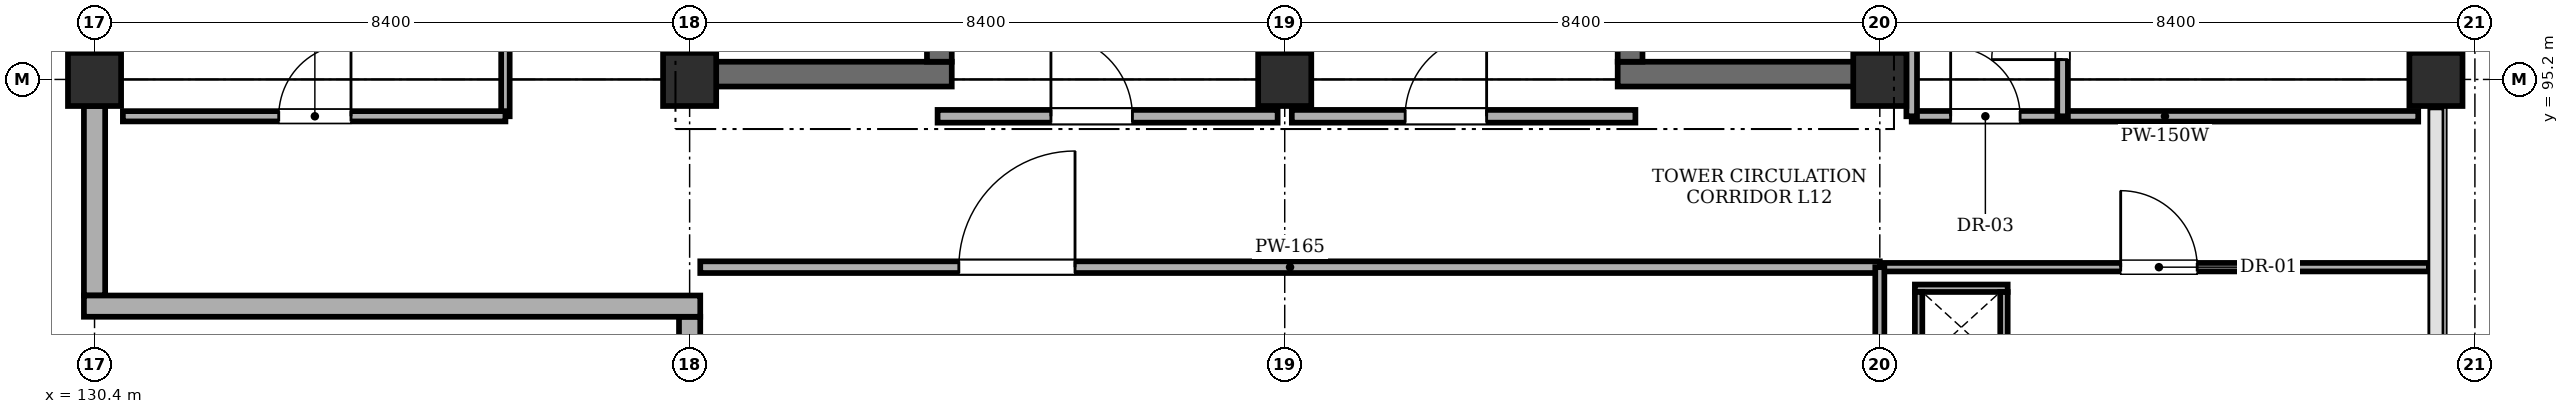
"""IFC4 building model, lengths in metres.
Left out: names, types, materials, properties, quantities, classifications, styles, units other than length and angle.
Written with IfcOpenShell. Run it as: python <this file> out.ifc"""

import sys

from ifc_helpers import new_model, si_unit, direction, frame, frame_2d, origin, origin_2d, place, context, subcontext, project, spatial, rectangle, extrude, element, fill, save


model = new_model("IFC4")
c1 = context("Model", 3, precision=1e-05, world=origin(), true_north=direction((0.0, 1.0)))
c2 = subcontext(c1, "Body", "Model", "MODEL_VIEW")
j1 = project(units=[si_unit("LENGTHUNIT", "METRE"), si_unit("PLANEANGLEUNIT", "RADIAN")], contexts=[c1])
p1 = place(None, origin())
s1 = spatial("IfcSite", under=j1, at=p1, CompositionType="ELEMENT")
p2 = place(p1, origin())
s2 = spatial("IfcBuilding", under=s1, at=p2, CompositionType="ELEMENT")
p3 = place(p2, frame((0.0, 0.0, 48.6)))
s3 = spatial("IfcBuildingStorey", under=s2, at=p3, CompositionType="ELEMENT", Elevation=48.6)
for number, where, z_axis, x_axis in (
    (1, (130.4, 95.2, 0.0), (0.0, 0.0, 1.0), (1.0, 0.0, 0.0)),
    (2, (138.8, 95.2, 0.0), (0.0, 0.0, 1.0), (1.0, 0.0, 0.0)),
    (3, (147.2, 95.2, 0.0), (0.0, 0.0, 1.0), (1.0, 0.0, 0.0)),
    (4, (155.6, 95.2, 0.0), (0.0, 0.0, 1.0), (1.0, 0.0, 0.0)),
    (5, (163.45, 95.2, 0.0), (0.0, 0.0, 1.0), (1.0, 0.0, 0.0)),
):
    element("IfcColumn", number, at=place(p3, frame(where, z_axis=z_axis, x_axis=x_axis)), inside=s3, PredefinedType="COLUMN", context=c2, shape_type="SweptSolid", body=[
        extrude(rectangle(XDim=0.75, YDim=0.75, at=origin_2d()), origin(), (0.0, 0.0, 1.0), 4.03),
    ])
p4 = place(p3, frame((138.7, 95.275, 0.0), z_axis=(0.0, 0.0, 1.0), x_axis=(1.0, 0.0, 0.0)))
e6 = element("IfcWall", 6, at=p4, inside=s3, PredefinedType="SHEAR", context=c2, shape_type="SweptSolid", body=[
    extrude(rectangle(XDim=3.8, YDim=0.35, at=frame_2d((1.9, 0.0))), origin(), (0.0, 0.0, 1.0), 4.03),
])
p5 = place(p3, frame((138.875, 95.45, 0.0), z_axis=(0.0, 0.0, 1.0), x_axis=(0.0, 1.0, 0.0)))
e7 = element("IfcWall", 7, at=p5, inside=s3, PredefinedType="SHEAR", context=c2, shape_type="SweptSolid", body=[
    extrude(rectangle(XDim=7.9, YDim=0.35, at=frame_2d((3.95, 0.0))), origin(), (0.0, 0.0, 1.0), 4.03),
])
p6 = place(p3, frame((142.325, 95.45, 0.0), z_axis=(0.0, 0.0, 1.0), x_axis=(0.0, 1.0, 0.0)))
e8 = element("IfcWall", 8, at=p6, inside=s3, PredefinedType="SHEAR", context=c2, shape_type="SweptSolid", body=[
    extrude(rectangle(XDim=7.9, YDim=0.35, at=frame_2d((3.95, 0.0))), origin(), (0.0, 0.0, 1.0), 4.03),
])
p7 = place(p6, frame((0.22, 0.0, 0.0)))
e9 = element("IfcOpeningElement", 9, at=p7, cuts=e8, PredefinedType="OPENING", context=c2, shape_type="SweptSolid", body=[
    extrude(rectangle(XDim=1.15, YDim=2.15, at=frame_2d((0.575, 1.075))), frame((0.0, 0.185, 0.0), z_axis=(0.0, -1.0, 0.0), x_axis=(1.0, 0.0, 0.0)), (0.0, 0.0, 1.0), 0.37),
])
p8 = place(p3, frame((151.9, 95.275, 0.0), z_axis=(0.0, 0.0, 1.0), x_axis=(1.0, 0.0, 0.0)))
e10 = element("IfcWall", 10, at=p8, inside=s3, PredefinedType="SHEAR", context=c2, shape_type="SweptSolid", body=[
    extrude(rectangle(XDim=3.8, YDim=0.35, at=frame_2d((1.9, 0.0))), origin(), (0.0, 0.0, 1.0), 4.03),
])
p9 = place(p3, frame((152.075, 95.45, 0.0), z_axis=(0.0, 0.0, 1.0), x_axis=(0.0, 1.0, 0.0)))
e11 = element("IfcWall", 11, at=p9, inside=s3, PredefinedType="SHEAR", context=c2, shape_type="SweptSolid", body=[
    extrude(rectangle(XDim=7.9, YDim=0.35, at=frame_2d((3.95, 0.0))), origin(), (0.0, 0.0, 1.0), 4.03),
])
p10 = place(p9, frame((0.35, 0.0, 0.0)))
e12 = element("IfcOpeningElement", 12, at=p10, cuts=e11, PredefinedType="OPENING", context=c2, shape_type="SweptSolid", body=[
    extrude(rectangle(XDim=1.15, YDim=2.15, at=frame_2d((0.575, 1.075))), frame((0.0, 0.185, 0.0), z_axis=(0.0, -1.0, 0.0), x_axis=(1.0, 0.0, 0.0)), (0.0, 0.0, 1.0), 0.37),
])
p11 = place(p3, frame((155.525, 95.45, 0.0), z_axis=(0.0, 0.0, 1.0), x_axis=(0.0, 1.0, 0.0)))
e13 = element("IfcWall", 13, at=p11, inside=s3, PredefinedType="SHEAR", context=c2, shape_type="SweptSolid", body=[
    extrude(rectangle(XDim=7.9, YDim=0.35, at=frame_2d((3.95, 0.0))), origin(), (0.0, 0.0, 1.0), 4.03),
])
p12 = place(p3, frame((163.45, 103.225, 0.0), z_axis=(0.0, 0.0, 1.0), x_axis=(0.0, -1.0, 0.0)))
e14 = element("IfcWall", 14, at=p12, inside=s3, PredefinedType="STANDARD", context=c2, shape_type="SweptSolid", body=[
    extrude(rectangle(XDim=7.65, YDim=0.3, at=frame_2d((3.825, 0.0))), origin(), (0.0, 0.0, 1.0), 3.33),
])
p13 = place(p12, frame((1.15, 0.0, 1.1)))
e15 = element("IfcOpeningElement", 15, at=p13, cuts=e14, PredefinedType="OPENING", context=c2, shape_type="SweptSolid", body=[
    extrude(rectangle(XDim=1.4, YDim=1.4, at=frame_2d((0.7, 0.7))), frame((0.0, 0.16, 0.0), z_axis=(0.0, -1.0, 0.0), x_axis=(1.0, 0.0, 0.0)), (0.0, 0.0, 1.0), 0.32),
])
p14 = place(p3, frame((130.4, 92.15, 0.0), z_axis=(0.0, 0.0, 1.0), x_axis=(0.0, 1.0, 0.0)))
e16 = element("IfcWall", 16, at=p14, inside=s3, PredefinedType="STANDARD", context=c2, shape_type="SweptSolid", body=[
    extrude(rectangle(XDim=2.675, YDim=0.3, at=frame_2d((1.337, 0.0))), origin(), (0.0, 0.0, 1.0), 4.03),
])
p15 = place(p3, frame((138.8, 87.175, 0.0), z_axis=(0.0, 0.0, 1.0), x_axis=(0.0, 1.0, 0.0)))
e17 = element("IfcWall", 17, at=p15, inside=s3, PredefinedType="STANDARD", context=c2, shape_type="SweptSolid", body=[
    extrude(rectangle(XDim=4.675, YDim=0.3, at=frame_2d((2.337, 0.0))), origin(), (0.0, 0.0, 1.0), 3.33),
])
p16 = place(p15, frame((2.4, 0.0, 0.95)))
e18 = element("IfcOpeningElement", 18, at=p16, cuts=e17, PredefinedType="OPENING", context=c2, shape_type="SweptSolid", body=[
    extrude(rectangle(XDim=1.5, YDim=1.8, at=frame_2d((0.75, 0.9))), frame((0.0, 0.16, 0.0), z_axis=(0.0, -1.0, 0.0), x_axis=(1.0, 0.0, 0.0)), (0.0, 0.0, 1.0), 0.32),
])
p17 = place(p3, frame((130.4, 95.575, 0.0), z_axis=(0.0, 0.0, 1.0), x_axis=(0.0, 1.0, 0.0)))
e19 = element("IfcWall", 19, at=p17, inside=s3, PredefinedType="STANDARD", context=c2, shape_type="SweptSolid", body=[
    extrude(rectangle(XDim=7.65, YDim=0.3, at=frame_2d((3.825, 0.0))), origin(), (0.0, 0.0, 1.0), 3.33),
])
p18 = place(p17, frame((2.4, 0.0, 1.0)))
e20 = element("IfcOpeningElement", 20, at=p18, cuts=e19, PredefinedType="OPENING", context=c2, shape_type="SweptSolid", body=[
    extrude(rectangle(XDim=1.8, YDim=1.8, at=frame_2d((0.9, 0.9))), frame((0.0, 0.16, 0.0), z_axis=(0.0, -1.0, 0.0), x_axis=(1.0, 0.0, 0.0)), (0.0, 0.0, 1.0), 0.32),
])
p19 = place(p3, frame((138.95, 92.0, 0.0), z_axis=(0.0, 0.0, 1.0), x_axis=(-1.0, 0.0, 0.0)))
e21 = element("IfcWall", 21, at=p19, inside=s3, PredefinedType="STANDARD", context=c2, shape_type="SweptSolid", body=[
    extrude(rectangle(XDim=8.7, YDim=0.3, at=frame_2d((4.35, 0.0))), origin(), (0.0, 0.0, 1.0), 4.03),
])
p20 = place(p3, frame((142.3, 94.68, 0.0), z_axis=(0.0, 0.0, 1.0), x_axis=(1.0, 0.0, 0.0)))
e22 = element("IfcWall", 22, at=p20, inside=s3, PredefinedType="STANDARD", context=c2, shape_type="SweptSolid", body=[
    extrude(rectangle(XDim=4.8, YDim=0.18, at=frame_2d((2.4, 0.0))), origin(), (0.0, 0.0, 1.0), 4.03),
])
p21 = place(p20, frame((1.6, 0.0, 0.0)))
e23 = element("IfcOpeningElement", 23, at=p21, cuts=e22, PredefinedType="OPENING", context=c2, shape_type="SweptSolid", body=[
    extrude(rectangle(XDim=1.15, YDim=2.15, at=frame_2d((0.575, 1.075))), frame((0.0, 0.1, 0.0), z_axis=(0.0, -1.0, 0.0), x_axis=(1.0, 0.0, 0.0)), (0.0, 0.0, 1.0), 0.2),
])
p22 = place(p3, frame((147.3, 94.68, 0.0), z_axis=(0.0, 0.0, 1.0), x_axis=(1.0, 0.0, 0.0)))
e24 = element("IfcWall", 24, at=p22, inside=s3, PredefinedType="STANDARD", context=c2, shape_type="SweptSolid", body=[
    extrude(rectangle(XDim=4.85, YDim=0.18, at=frame_2d((2.425, 0.0))), origin(), (0.0, 0.0, 1.0), 4.03),
])
p23 = place(p22, frame((1.6, 0.0, 0.0)))
e25 = element("IfcOpeningElement", 25, at=p23, cuts=e24, PredefinedType="OPENING", context=c2, shape_type="SweptSolid", body=[
    extrude(rectangle(XDim=1.15, YDim=2.15, at=frame_2d((0.575, 1.075))), frame((0.0, 0.1, 0.0), z_axis=(0.0, -1.0, 0.0), x_axis=(1.0, 0.0, 0.0)), (0.0, 0.0, 1.0), 0.2),
])
p24 = place(p3, frame((156.05, 94.68, 0.0), z_axis=(0.0, 0.0, 1.0), x_axis=(1.0, 0.0, 0.0)))
e26 = element("IfcWall", 26, at=p24, inside=s3, PredefinedType="PARTITIONING", context=c2, shape_type="SweptSolid", body=[
    extrude(rectangle(XDim=7.15, YDim=0.15, at=frame_2d((3.575, 0.0))), origin(), (0.0, 0.0, 1.0), 4.03),
])
p25 = place(p24, frame((0.55, 0.0, 0.0)))
e27 = element("IfcOpeningElement", 27, at=p25, cuts=e26, PredefinedType="OPENING", context=c2, shape_type="SweptSolid", body=[
    extrude(rectangle(XDim=0.98, YDim=2.12, at=frame_2d((0.49, 1.06))), frame((0.0, 0.085, 0.0), z_axis=(0.0, -1.0, 0.0), x_axis=(1.0, 0.0, 0.0)), (0.0, 0.0, 1.0), 0.17),
])
p26 = place(p3, frame((158.18, 94.68, 0.0), z_axis=(0.0, 0.0, 1.0), x_axis=(0.0, 1.0, 0.0)))
e28 = element("IfcWall", 28, at=p26, inside=s3, PredefinedType="PARTITIONING", context=c2, shape_type="SweptSolid", body=[
    extrude(rectangle(XDim=8.57, YDim=0.15, at=frame_2d((4.285, 0.0))), origin(), (0.0, 0.0, 1.0), 4.03),
])
p27 = place(p26, frame((0.8, 0.0, 0.0)))
e29 = element("IfcOpeningElement", 29, at=p27, cuts=e28, PredefinedType="OPENING", context=c2, shape_type="SweptSolid", body=[
    extrude(rectangle(XDim=1.0, YDim=2.12, at=frame_2d((0.5, 1.06))), frame((0.0, 0.085, 0.0), z_axis=(0.0, -1.0, 0.0), x_axis=(1.0, 0.0, 0.0)), (0.0, 0.0, 1.0), 0.17),
])
p28 = place(p26, frame((3.5, 0.0, 0.0)))
e30 = element("IfcOpeningElement", 30, at=p28, cuts=e28, PredefinedType="OPENING", context=c2, shape_type="SweptSolid", body=[
    extrude(rectangle(XDim=0.92, YDim=2.1, at=frame_2d((0.46, 1.05))), frame((0.0, 0.085, 0.0), z_axis=(0.0, -1.0, 0.0), x_axis=(1.0, 0.0, 0.0)), (0.0, 0.0, 1.0), 0.17),
])
p29 = place(p26, frame((6.4, 0.0, 0.0)))
e31 = element("IfcOpeningElement", 31, at=p29, cuts=e28, PredefinedType="OPENING", context=c2, shape_type="SweptSolid", body=[
    extrude(rectangle(XDim=0.92, YDim=2.1, at=frame_2d((0.46, 1.05))), frame((0.0, 0.085, 0.0), z_axis=(0.0, -1.0, 0.0), x_axis=(1.0, 0.0, 0.0)), (0.0, 0.0, 1.0), 0.17),
])
p30 = place(p3, frame((156.05, 94.68, 0.0), z_axis=(0.0, 0.0, 1.0), x_axis=(0.0, 1.0, 0.0)))
e32 = element("IfcWall", 32, at=p30, inside=s3, PredefinedType="PARTITIONING", context=c2, shape_type="SweptSolid", body=[
    extrude(rectangle(XDim=8.57, YDim=0.15, at=frame_2d((4.285, 0.0))), origin(), (0.0, 0.0, 1.0), 4.03),
])
p31 = place(p3, frame((136.2, 94.68, 0.0), z_axis=(0.0, 0.0, 1.0), x_axis=(0.0, 1.0, 0.0)))
e33 = element("IfcWall", 33, at=p31, inside=s3, PredefinedType="PARTITIONING", context=c2, shape_type="SweptSolid", body=[
    extrude(rectangle(XDim=9.07, YDim=0.12, at=frame_2d((4.535, 0.0))), origin(), (0.0, 0.0, 1.0), 4.03),
])
p32 = place(p3, frame((130.8, 94.68, 0.0), z_axis=(0.0, 0.0, 1.0), x_axis=(1.0, 0.0, 0.0)))
e34 = element("IfcWall", 34, at=p32, inside=s3, PredefinedType="PARTITIONING", context=c2, shape_type="SweptSolid", body=[
    extrude(rectangle(XDim=5.4, YDim=0.145, at=frame_2d((2.7, 0.0))), origin(), (0.0, 0.0, 1.0), 4.03),
])
p33 = place(p32, frame((2.2, 0.0, 0.0)))
e35 = element("IfcOpeningElement", 35, at=p33, cuts=e34, PredefinedType="OPENING", context=c2, shape_type="SweptSolid", body=[
    extrude(rectangle(XDim=1.02, YDim=2.15, at=frame_2d((0.51, 1.075))), frame((0.0, 0.083, 0.0), z_axis=(0.0, -1.0, 0.0), x_axis=(1.0, 0.0, 0.0)), (0.0, 0.0, 1.0), 0.165),
])
p34 = place(p3, frame((138.95, 92.55, 0.0), z_axis=(0.0, 0.0, 1.0), x_axis=(1.0, 0.0, 0.0)))
e36 = element("IfcWall", 36, at=p34, inside=s3, PredefinedType="PARTITIONING", context=c2, shape_type="SweptSolid", body=[
    extrude(rectangle(XDim=16.65, YDim=0.165, at=frame_2d((8.325, 0.0))), origin(), (0.0, 0.0, 1.0), 4.03),
])
p35 = place(p34, frame((3.65, 0.0, 0.0)))
e37 = element("IfcOpeningElement", 37, at=p35, cuts=e36, PredefinedType="OPENING", context=c2, shape_type="SweptSolid", body=[
    extrude(rectangle(XDim=1.64, YDim=2.24, at=frame_2d((0.82, 1.12))), frame((0.0, 0.093, 0.0), z_axis=(0.0, -1.0, 0.0), x_axis=(1.0, 0.0, 0.0)), (0.0, 0.0, 1.0), 0.185),
])
p36 = place(p3, frame((155.6, 92.55, 0.0), z_axis=(0.0, 0.0, 1.0), x_axis=(1.0, 0.0, 0.0)))
e38 = element("IfcWall", 38, at=p36, inside=s3, PredefinedType="PARTITIONING", context=c2, shape_type="SweptSolid", body=[
    extrude(rectangle(XDim=7.75, YDim=0.12, at=frame_2d((3.875, 0.0))), origin(), (0.0, 0.0, 1.0), 4.03),
])
p37 = place(p36, frame((3.4, 0.0, 0.0)))
e39 = element("IfcOpeningElement", 39, at=p37, cuts=e38, PredefinedType="OPENING", context=c2, shape_type="SweptSolid", body=[
    extrude(rectangle(XDim=1.08, YDim=2.15, at=frame_2d((0.54, 1.075))), frame((0.0, 0.07, 0.0), z_axis=(0.0, -1.0, 0.0), x_axis=(1.0, 0.0, 0.0)), (0.0, 0.0, 1.0), 0.14),
])
p38 = place(p3, frame((155.6, 78.55, 0.0), z_axis=(0.0, 0.0, 1.0), x_axis=(0.0, 1.0, 0.0)))
e40 = element("IfcWall", 40, at=p38, inside=s3, PredefinedType="PARTITIONING", context=c2, shape_type="SweptSolid", body=[
    extrude(rectangle(XDim=14.0, YDim=0.128, at=frame_2d((7.0, 0.0))), origin(), (0.0, 0.0, 1.0), 3.33),
])
p39 = place(p3, frame((156.095, 92.252, 0.0), z_axis=(0.0, 0.0, 1.0), x_axis=(1.0, 0.0, 0.0)))
e41 = element("IfcWall", 41, at=p39, inside=s3, PredefinedType="PARTITIONING", context=c2, shape_type="SweptSolid", body=[
    extrude(rectangle(XDim=1.31, YDim=0.105, at=frame_2d((0.655, 0.0))), origin(), (0.0, 0.0, 1.0), 4.03),
])
for number, where, z_axis, x_axis in (
    (42, (156.147, 91.2, 0.0), (0.0, 0.0, 1.0), (0.0, 1.0, 0.0)),
    (43, (157.353, 91.2, 0.0), (0.0, 0.0, 1.0), (0.0, 1.0, 0.0)),
):
    element("IfcWall", number, at=place(p3, frame(where, z_axis=z_axis, x_axis=x_axis)), inside=s3, PredefinedType="PARTITIONING", context=c2, shape_type="SweptSolid", body=[
        extrude(rectangle(XDim=1.0, YDim=0.105, at=frame_2d((0.5, 0.0))), origin(), (0.0, 0.0, 1.0), 4.03),
    ])
p40 = place(p21, origin())
e44 = element("IfcDoor", 44, at=p40, inside=s3, OperationType="SINGLE_SWING_LEFT", PredefinedType="DOOR", context=c2, shape_type="SweptSolid", body=[
    extrude(rectangle(XDim=1.15, YDim=2.15, at=frame_2d((0.575, 1.075))), frame((0.0, 0.025, 0.0), z_axis=(0.0, -1.0, 0.0), x_axis=(1.0, 0.0, 0.0)), (0.0, 0.0, 1.0), 0.05),
])
fill(e23, e44)
p41 = place(p23, origin())
e45 = element("IfcDoor", 45, at=p41, inside=s3, OperationType="SINGLE_SWING_RIGHT", PredefinedType="DOOR", context=c2, shape_type="SweptSolid", body=[
    extrude(rectangle(XDim=1.15, YDim=2.15, at=frame_2d((0.575, 1.075))), frame((0.0, 0.025, 0.0), z_axis=(0.0, -1.0, 0.0), x_axis=(1.0, 0.0, 0.0)), (0.0, 0.0, 1.0), 0.05),
])
fill(e25, e45)
p42 = place(p25, origin())
e46 = element("IfcDoor", 46, at=p42, inside=s3, OperationType="SINGLE_SWING_LEFT", PredefinedType="DOOR", context=c2, shape_type="SweptSolid", body=[
    extrude(rectangle(XDim=0.98, YDim=2.12, at=frame_2d((0.49, 1.06))), frame((0.0, 0.025, 0.0), z_axis=(0.0, -1.0, 0.0), x_axis=(1.0, 0.0, 0.0)), (0.0, 0.0, 1.0), 0.05),
])
fill(e27, e46)
p43 = place(p27, origin())
e47 = element("IfcDoor", 47, at=p43, inside=s3, OperationType="SINGLE_SWING_LEFT", PredefinedType="DOOR", context=c2, shape_type="SweptSolid", body=[
    extrude(rectangle(XDim=1.0, YDim=2.12, at=frame_2d((0.5, 1.06))), frame((0.0, 0.025, 0.0), z_axis=(0.0, -1.0, 0.0), x_axis=(1.0, 0.0, 0.0)), (0.0, 0.0, 1.0), 0.05),
])
fill(e29, e47)
p44 = place(p33, origin())
e48 = element("IfcDoor", 48, at=p44, inside=s3, OperationType="SINGLE_SWING_RIGHT", PredefinedType="DOOR", context=c2, shape_type="SweptSolid", body=[
    extrude(rectangle(XDim=1.02, YDim=2.15, at=frame_2d((0.51, 1.075))), frame((0.0, 0.025, 0.0), z_axis=(0.0, -1.0, 0.0), x_axis=(1.0, 0.0, 0.0)), (0.0, 0.0, 1.0), 0.05),
])
fill(e35, e48)
p45 = place(p35, origin())
e49 = element("IfcDoor", 49, at=p45, inside=s3, OperationType="SINGLE_SWING_RIGHT", PredefinedType="DOOR", context=c2, shape_type="SweptSolid", body=[
    extrude(rectangle(XDim=1.64, YDim=2.24, at=frame_2d((0.82, 1.12))), frame((0.0, 0.025, 0.0), z_axis=(0.0, -1.0, 0.0), x_axis=(1.0, 0.0, 0.0)), (0.0, 0.0, 1.0), 0.05),
])
fill(e37, e49)
p46 = place(p37, origin())
e50 = element("IfcDoor", 50, at=p46, inside=s3, OperationType="SINGLE_SWING_LEFT", PredefinedType="DOOR", context=c2, shape_type="SweptSolid", body=[
    extrude(rectangle(XDim=1.08, YDim=2.15, at=frame_2d((0.54, 1.075))), frame((0.0, 0.025, 0.0), z_axis=(0.0, -1.0, 0.0), x_axis=(1.0, 0.0, 0.0)), (0.0, 0.0, 1.0), 0.05),
])
fill(e39, e50)
save(model, sys.argv[1])
